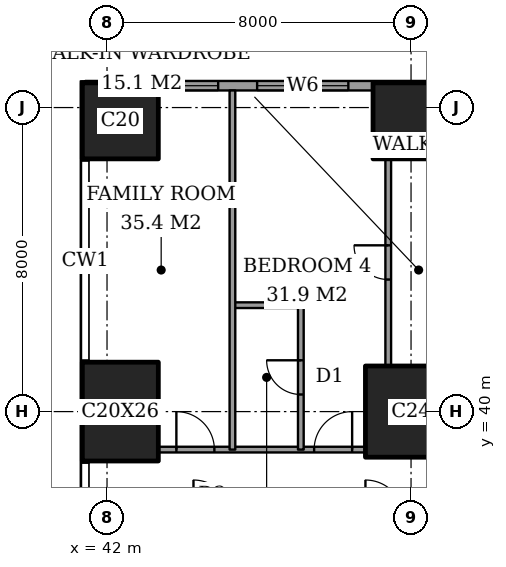
"""IFC4 building model, lengths in metres.
Left out: names, types, materials, properties, quantities, classifications, styles, units other than length and angle.
Written with IfcOpenShell. Run it as: python <this file> out.ifc"""

import sys

from ifc_helpers import new_model, si_unit, direction, frame, frame_2d, origin, origin_2d, place, context, subcontext, project, spatial, rectangle, extrude, element, fill, save


model = new_model("IFC4")
c1 = context("Model", 3, precision=1e-05, world=origin(), true_north=direction((0.0, 1.0)))
c2 = subcontext(c1, "Body", "Model", "MODEL_VIEW")
j1 = project(units=[si_unit("LENGTHUNIT", "METRE"), si_unit("PLANEANGLEUNIT", "RADIAN")], contexts=[c1])
p1 = place(None, origin())
s1 = spatial("IfcSite", under=j1, at=p1, CompositionType="ELEMENT")
p2 = place(p1, origin())
s2 = spatial("IfcBuilding", under=s1, at=p2, CompositionType="ELEMENT")
p3 = place(p2, frame((0.0, 0.0, 62.0)))
s3 = spatial("IfcBuildingStorey", under=s2, at=p3, CompositionType="ELEMENT", Elevation=62.0)
p4 = place(p3, frame((42.35, 40.0, 0.0), z_axis=(0.0, 0.0, 1.0), x_axis=(1.0, 0.0, 0.0)))
e1 = element("IfcColumn", 1, at=p4, inside=s3, PredefinedType="COLUMN", context=c2, shape_type="SweptSolid", body=[
    extrude(rectangle(XDim=2.0, YDim=2.6, at=origin_2d()), origin(), (0.0, 0.0, 1.0), 3.6),
])
p5 = place(p3, frame((42.35, 47.65, 0.0), z_axis=(0.0, 0.0, 1.0), x_axis=(1.0, 0.0, 0.0)))
e2 = element("IfcColumn", 2, at=p5, inside=s3, PredefinedType="COLUMN", context=c2, shape_type="SweptSolid", body=[
    extrude(rectangle(XDim=2.0, YDim=2.0, at=origin_2d()), origin(), (0.0, 0.0, 1.0), 3.6),
])
p6 = place(p3, frame((50.0, 40.0, 0.0), z_axis=(0.0, 0.0, 1.0), x_axis=(1.0, 0.0, 0.0)))
e3 = element("IfcColumn", 3, at=p6, inside=s3, PredefinedType="COLUMN", context=c2, shape_type="SweptSolid", body=[
    extrude(rectangle(XDim=2.4, YDim=2.4, at=origin_2d()), origin(), (0.0, 0.0, 1.0), 3.6),
])
p7 = place(p3, frame((50.0, 47.65, 0.0), z_axis=(0.0, 0.0, 1.0), x_axis=(1.0, 0.0, 0.0)))
e4 = element("IfcColumn", 4, at=p7, inside=s3, PredefinedType="COLUMN", context=c2, shape_type="SweptSolid", body=[
    extrude(rectangle(XDim=2.0, YDim=2.0, at=origin_2d()), origin(), (0.0, 0.0, 1.0), 3.6),
])
p8 = place(p3, frame((62.825, 48.575, 0.0), z_axis=(0.0, 0.0, 1.0), x_axis=(-1.0, 0.0, 0.0)))
e5 = element("IfcWall", 5, at=p8, inside=s3, PredefinedType="SOLIDWALL", context=c2, shape_type="SweptSolid", body=[
    extrude(rectangle(XDim=21.4, YDim=0.25, at=frame_2d((10.7, 0.0))), origin(), (0.0, 0.0, 1.0), 3.6),
])
p9 = place(p8, frame((1.0, 0.0, 0.6)))
e6 = element("IfcOpeningElement", 6, at=p9, cuts=e5, PredefinedType="OPENING", context=c2, shape_type="SweptSolid", body=[
    extrude(rectangle(XDim=1.2, YDim=2.0, at=frame_2d((0.6, 1.0))), frame((0.0, 0.135, 0.0), z_axis=(0.0, -1.0, 0.0), x_axis=(1.0, 0.0, 0.0)), (0.0, 0.0, 1.0), 0.27),
])
p10 = place(p8, frame((6.775, 0.0, 0.6)))
e7 = element("IfcOpeningElement", 7, at=p10, cuts=e5, PredefinedType="OPENING", context=c2, shape_type="SweptSolid", body=[
    extrude(rectangle(XDim=2.4, YDim=2.0, at=frame_2d((1.2, 1.0))), frame((0.0, 0.135, 0.0), z_axis=(0.0, -1.0, 0.0), x_axis=(1.0, 0.0, 0.0)), (0.0, 0.0, 1.0), 0.27),
])
p11 = place(p8, frame((10.45, 0.0, 0.6)))
e8 = element("IfcOpeningElement", 8, at=p11, cuts=e5, PredefinedType="OPENING", context=c2, shape_type="SweptSolid", body=[
    extrude(rectangle(XDim=1.2, YDim=2.0, at=frame_2d((0.6, 1.0))), frame((0.0, 0.135, 0.0), z_axis=(0.0, -1.0, 0.0), x_axis=(1.0, 0.0, 0.0)), (0.0, 0.0, 1.0), 0.27),
])
p12 = place(p8, frame((14.475, 0.0, 0.6)))
e9 = element("IfcOpeningElement", 9, at=p12, cuts=e5, PredefinedType="OPENING", context=c2, shape_type="SweptSolid", body=[
    extrude(rectangle(XDim=2.4, YDim=2.0, at=frame_2d((1.2, 1.0))), frame((0.0, 0.135, 0.0), z_axis=(0.0, -1.0, 0.0), x_axis=(1.0, 0.0, 0.0)), (0.0, 0.0, 1.0), 0.27),
])
p13 = place(p8, frame((17.9, 0.0, 0.6)))
e10 = element("IfcOpeningElement", 10, at=p13, cuts=e5, PredefinedType="OPENING", context=c2, shape_type="SweptSolid", body=[
    extrude(rectangle(XDim=1.2, YDim=2.0, at=frame_2d((0.6, 1.0))), frame((0.0, 0.135, 0.0), z_axis=(0.0, -1.0, 0.0), x_axis=(1.0, 0.0, 0.0)), (0.0, 0.0, 1.0), 0.27),
])
p14 = place(p3, frame((43.35, 39.0, 0.0), z_axis=(0.0, 0.0, 1.0), x_axis=(1.0, 0.0, 0.0)))
e11 = element("IfcWall", 11, at=p14, inside=s3, PredefinedType="PARTITIONING", context=c2, shape_type="SweptSolid", body=[
    extrude(rectangle(XDim=5.45, YDim=0.15, at=frame_2d((2.725, 0.0))), origin(), (0.0, 0.0, 1.0), 3.35),
])
p15 = place(p14, frame((4.1, 0.0, 0.0)))
e12 = element("IfcOpeningElement", 12, at=p15, cuts=e11, PredefinedType="OPENING", context=c2, shape_type="SweptSolid", body=[
    extrude(rectangle(XDim=1.0, YDim=2.1, at=frame_2d((0.5, 1.05))), frame((0.0, 0.085, 0.0), z_axis=(0.0, -1.0, 0.0), x_axis=(1.0, 0.0, 0.0)), (0.0, 0.0, 1.0), 0.17),
])
p16 = place(p14, frame((0.475, 0.0, 0.0)))
e13 = element("IfcOpeningElement", 13, at=p16, cuts=e11, PredefinedType="OPENING", context=c2, shape_type="SweptSolid", body=[
    extrude(rectangle(XDim=1.0, YDim=2.1, at=frame_2d((0.5, 1.05))), frame((0.0, 0.085, 0.0), z_axis=(0.0, -1.0, 0.0), x_axis=(1.0, 0.0, 0.0)), (0.0, 0.0, 1.0), 0.17),
])
p17 = place(p3, frame((45.3, 42.8, 0.0), z_axis=(0.0, 0.0, 1.0), x_axis=(1.0, 0.0, 0.0)))
e14 = element("IfcWall", 14, at=p17, inside=s3, PredefinedType="PARTITIONING", context=c2, shape_type="SweptSolid", body=[
    extrude(rectangle(XDim=1.8, YDim=0.15, at=frame_2d((0.9, 0.0))), origin(), (0.0, 0.0, 1.0), 3.35),
])
p18 = place(p3, frame((45.3, 39.0, 0.0), z_axis=(0.0, 0.0, 1.0), x_axis=(0.0, 1.0, 0.0)))
e15 = element("IfcWall", 15, at=p18, inside=s3, PredefinedType="PARTITIONING", context=c2, shape_type="SweptSolid", body=[
    extrude(rectangle(XDim=9.45, YDim=0.15, at=frame_2d((4.725, 0.0))), origin(), (0.0, 0.0, 1.0), 3.35),
])
p19 = place(p3, frame((47.1, 39.0, 0.0), z_axis=(0.0, 0.0, 1.0), x_axis=(0.0, 1.0, 0.0)))
e16 = element("IfcWall", 16, at=p19, inside=s3, PredefinedType="PARTITIONING", context=c2, shape_type="SweptSolid", body=[
    extrude(rectangle(XDim=3.8, YDim=0.15, at=frame_2d((1.9, 0.0))), origin(), (0.0, 0.0, 1.0), 3.35),
])
p20 = place(p19, frame((1.45, 0.0, 0.0)))
e17 = element("IfcOpeningElement", 17, at=p20, cuts=e16, PredefinedType="OPENING", context=c2, shape_type="SweptSolid", body=[
    extrude(rectangle(XDim=0.9, YDim=2.1, at=frame_2d((0.45, 1.05))), frame((0.0, 0.085, 0.0), z_axis=(0.0, -1.0, 0.0), x_axis=(1.0, 0.0, 0.0)), (0.0, 0.0, 1.0), 0.17),
])
p21 = place(p3, frame((49.4, 41.2, 0.0), z_axis=(0.0, 0.0, 1.0), x_axis=(0.0, 1.0, 0.0)))
e18 = element("IfcWall", 18, at=p21, inside=s3, PredefinedType="PARTITIONING", context=c2, shape_type="SweptSolid", body=[
    extrude(rectangle(XDim=5.45, YDim=0.15, at=frame_2d((2.725, 0.0))), origin(), (0.0, 0.0, 1.0), 3.35),
])
p22 = place(p21, frame((2.275, 0.0, 0.0)))
e19 = element("IfcOpeningElement", 19, at=p22, cuts=e18, PredefinedType="OPENING", context=c2, shape_type="SweptSolid", body=[
    extrude(rectangle(XDim=0.9, YDim=2.1, at=frame_2d((0.45, 1.05))), frame((0.0, 0.085, 0.0), z_axis=(0.0, -1.0, 0.0), x_axis=(1.0, 0.0, 0.0)), (0.0, 0.0, 1.0), 0.17),
])
p23 = place(p12, origin())
e20 = element("IfcWindow", 20, at=p23, inside=s3, PartitioningType="SINGLE_PANEL", PredefinedType="WINDOW", context=c2, shape_type="SweptSolid", body=[
    extrude(rectangle(XDim=2.4, YDim=2.0, at=frame_2d((1.2, 1.0))), frame((0.0, 0.03, 0.0), z_axis=(0.0, -1.0, 0.0), x_axis=(1.0, 0.0, 0.0)), (0.0, 0.0, 1.0), 0.06),
])
fill(e9, e20)
p24 = place(p13, origin())
e21 = element("IfcWindow", 21, at=p24, inside=s3, PartitioningType="SINGLE_PANEL", PredefinedType="WINDOW", context=c2, shape_type="SweptSolid", body=[
    extrude(rectangle(XDim=1.2, YDim=2.0, at=frame_2d((0.6, 1.0))), frame((0.0, 0.03, 0.0), z_axis=(0.0, -1.0, 0.0), x_axis=(1.0, 0.0, 0.0)), (0.0, 0.0, 1.0), 0.06),
])
fill(e10, e21)
p25 = place(p22, origin())
e22 = element("IfcDoor", 22, at=p25, inside=s3, OperationType="SINGLE_SWING_LEFT", PredefinedType="DOOR", context=c2, shape_type="SweptSolid", body=[
    extrude(rectangle(XDim=0.9, YDim=2.1, at=frame_2d((0.45, 1.05))), frame((0.0, 0.025, 0.0), z_axis=(0.0, -1.0, 0.0), x_axis=(1.0, 0.0, 0.0)), (0.0, 0.0, 1.0), 0.05),
])
fill(e19, e22)
p26 = place(p20, origin())
e23 = element("IfcDoor", 23, at=p26, inside=s3, OperationType="SINGLE_SWING_LEFT", PredefinedType="DOOR", context=c2, shape_type="SweptSolid", body=[
    extrude(rectangle(XDim=0.9, YDim=2.1, at=frame_2d((0.45, 1.05))), frame((0.0, 0.025, 0.0), z_axis=(0.0, -1.0, 0.0), x_axis=(1.0, 0.0, 0.0)), (0.0, 0.0, 1.0), 0.05),
])
fill(e17, e23)
p27 = place(p15, origin())
e24 = element("IfcDoor", 24, at=p27, inside=s3, OperationType="SINGLE_SWING_LEFT", PredefinedType="DOOR", context=c2, shape_type="SweptSolid", body=[
    extrude(rectangle(XDim=1.0, YDim=2.1, at=frame_2d((0.5, 1.05))), frame((0.0, 0.025, 0.0), z_axis=(0.0, -1.0, 0.0), x_axis=(1.0, 0.0, 0.0)), (0.0, 0.0, 1.0), 0.05),
])
fill(e12, e24)
p28 = place(p16, origin())
e25 = element("IfcDoor", 25, at=p28, inside=s3, OperationType="SINGLE_SWING_RIGHT", PredefinedType="DOOR", context=c2, shape_type="SweptSolid", body=[
    extrude(rectangle(XDim=1.0, YDim=2.1, at=frame_2d((0.5, 1.05))), frame((0.0, 0.025, 0.0), z_axis=(0.0, -1.0, 0.0), x_axis=(1.0, 0.0, 0.0)), (0.0, 0.0, 1.0), 0.05),
])
fill(e13, e25)
save(model, sys.argv[1])
